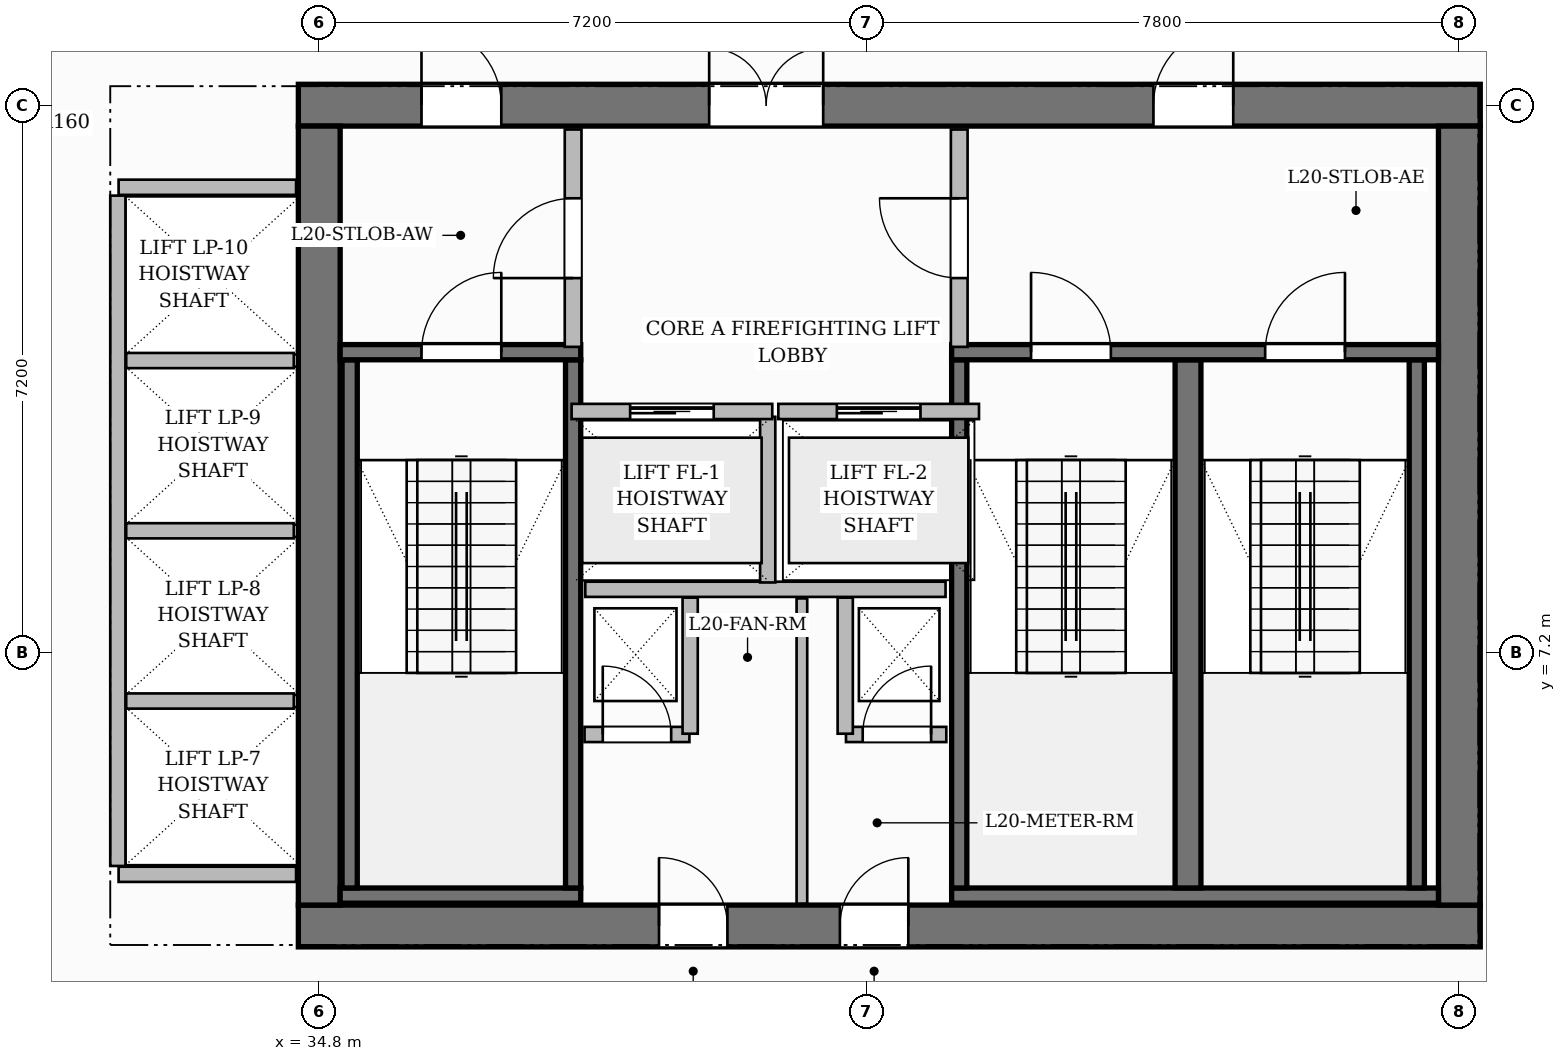
"""IFC4 building model, lengths in metres.
Left out: names, types, materials, properties, quantities, classifications, styles, units other than length and angle.
Written with IfcOpenShell. Run it as: python <this file> out.ifc"""

import sys

from ifc_helpers import new_model, si_unit, direction, frame, frame_2d, origin, place, context, subcontext, project, spatial, rectangle, extrude, source, transform, mapped, element, fill, save


model = new_model("IFC4")
c1 = context("Model", 3, precision=1e-05, world=origin(), true_north=direction((0.0, 1.0)))
c2 = subcontext(c1, "Body", "Model", "MODEL_VIEW")
j1 = project(units=[si_unit("LENGTHUNIT", "METRE"), si_unit("PLANEANGLEUNIT", "RADIAN")], contexts=[c1])
p1 = place(None, origin())
s1 = spatial("IfcSite", under=j1, at=p1, CompositionType="ELEMENT")
p2 = place(p1, origin())
s2 = spatial("IfcBuilding", under=s1, at=p2, CompositionType="ELEMENT")
p3 = place(p2, frame((0.0, 0.0, 84.2)))
s3 = spatial("IfcBuildingStorey", under=s2, at=p3, CompositionType="ELEMENT", Elevation=84.2)
p4 = place(p3, frame((34.525, 3.6, 0.0), z_axis=(0.0, 0.0, 1.0), x_axis=(1.0, 0.0, 0.0)))
e1 = element("IfcWall", 1, at=p4, inside=s3, PredefinedType="SHEAR", context=c2, shape_type="SweptSolid", body=[
    extrude(rectangle(XDim=15.55, YDim=0.55, at=frame_2d((7.775, 0.0))), origin(), (0.0, 0.0, 1.0), 3.7),
])
p5 = place(p4, frame((4.745, 0.0, 0.0)))
e2 = element("IfcOpeningElement", 2, at=p5, cuts=e1, PredefinedType="OPENING", context=c2, shape_type="SweptSolid", body=[
    extrude(rectangle(XDim=0.9, YDim=2.1, at=frame_2d((0.45, 1.05))), frame((0.0, 0.285, 0.0), z_axis=(0.0, -1.0, 0.0), x_axis=(1.0, 0.0, 0.0)), (0.0, 0.0, 1.0), 0.57),
])
p6 = place(p4, frame((7.125, 0.0, 0.0)))
e3 = element("IfcOpeningElement", 3, at=p6, cuts=e1, PredefinedType="OPENING", context=c2, shape_type="SweptSolid", body=[
    extrude(rectangle(XDim=0.9, YDim=2.1, at=frame_2d((0.45, 1.05))), frame((0.0, 0.285, 0.0), z_axis=(0.0, -1.0, 0.0), x_axis=(1.0, 0.0, 0.0)), (0.0, 0.0, 1.0), 0.57),
])
p7 = place(p3, frame((34.525, 14.4, 0.0), z_axis=(0.0, 0.0, 1.0), x_axis=(1.0, 0.0, 0.0)))
e4 = element("IfcWall", 4, at=p7, inside=s3, PredefinedType="SHEAR", context=c2, shape_type="SweptSolid", body=[
    extrude(rectangle(XDim=15.55, YDim=0.55, at=frame_2d((7.775, 0.0))), origin(), (0.0, 0.0, 1.0), 3.7),
])
p8 = place(p7, frame((5.405, 0.0, 0.0)))
e5 = element("IfcOpeningElement", 5, at=p8, cuts=e4, PredefinedType="OPENING", context=c2, shape_type="SweptSolid", body=[
    extrude(rectangle(XDim=1.5, YDim=2.2, at=frame_2d((0.75, 1.1))), frame((0.0, 0.285, 0.0), z_axis=(0.0, -1.0, 0.0), x_axis=(1.0, 0.0, 0.0)), (0.0, 0.0, 1.0), 0.57),
])
p9 = place(p7, frame((1.62, 0.0, 0.0)))
e6 = element("IfcOpeningElement", 6, at=p9, cuts=e4, PredefinedType="OPENING", context=c2, shape_type="SweptSolid", body=[
    extrude(rectangle(XDim=1.05, YDim=2.15, at=frame_2d((0.525, 1.075))), frame((0.0, 0.285, 0.0), z_axis=(0.0, -1.0, 0.0), x_axis=(1.0, 0.0, 0.0)), (0.0, 0.0, 1.0), 0.57),
])
p10 = place(p7, frame((11.25, 0.0, 0.0)))
e7 = element("IfcOpeningElement", 7, at=p10, cuts=e4, PredefinedType="OPENING", context=c2, shape_type="SweptSolid", body=[
    extrude(rectangle(XDim=1.05, YDim=2.15, at=frame_2d((0.525, 1.075))), frame((0.0, 0.285, 0.0), z_axis=(0.0, -1.0, 0.0), x_axis=(1.0, 0.0, 0.0)), (0.0, 0.0, 1.0), 0.57),
])
for number, where, z_axis, x_axis in (
    (8, (34.8, 3.875, 0.0), (0.0, 0.0, 1.0), (0.0, 1.0, 0.0)),
    (9, (49.8, 3.875, 0.0), (0.0, 0.0, 1.0), (0.0, 1.0, 0.0)),
):
    element("IfcWall", number, at=place(p3, frame(where, z_axis=z_axis, x_axis=x_axis)), inside=s3, PredefinedType="SHEAR", context=c2, shape_type="SweptSolid", body=[
        extrude(rectangle(XDim=10.25, YDim=0.55, at=frame_2d((5.125, 0.0))), origin(), (0.0, 0.0, 1.0), 3.7),
    ])
p11 = place(p3, frame((35.075, 4.0, 0.0), z_axis=(0.0, 0.0, 1.0), x_axis=(1.0, 0.0, 0.0)))
e10 = element("IfcWall", 10, at=p11, inside=s3, PredefinedType="SHEAR", context=c2, shape_type="SweptSolid", body=[
    extrude(rectangle(XDim=3.165, YDim=0.2, at=frame_2d((1.583, 0.0))), origin(), (0.0, 0.0, 1.0), 3.7),
])
for number, where, z_axis, x_axis in (
    (11, (35.2, 4.1, 0.0), (0.0, 0.0, 1.0), (0.0, 1.0, 0.0)),
    (12, (38.14, 4.1, 0.0), (0.0, 0.0, 1.0), (0.0, 1.0, 0.0)),
):
    element("IfcWall", number, at=place(p3, frame(where, z_axis=z_axis, x_axis=x_axis)), inside=s3, PredefinedType="SHEAR", context=c2, shape_type="SweptSolid", body=[
        extrude(rectangle(XDim=6.95, YDim=0.2, at=frame_2d((3.475, 0.0))), origin(), (0.0, 0.0, 1.0), 3.7),
    ])
p12 = place(p3, frame((35.075, 11.15, 0.0), z_axis=(0.0, 0.0, 1.0), x_axis=(1.0, 0.0, 0.0)))
e13 = element("IfcWall", 13, at=p12, inside=s3, PredefinedType="SHEAR", context=c2, shape_type="SweptSolid", body=[
    extrude(rectangle(XDim=3.165, YDim=0.2, at=frame_2d((1.583, 0.0))), origin(), (0.0, 0.0, 1.0), 3.7),
])
p13 = place(p12, frame((1.07, 0.0, 0.0)))
e14 = element("IfcOpeningElement", 14, at=p13, cuts=e13, PredefinedType="OPENING", context=c2, shape_type="SweptSolid", body=[
    extrude(rectangle(XDim=1.05, YDim=2.2, at=frame_2d((0.525, 1.1))), frame((0.0, 0.11, 0.0), z_axis=(0.0, -1.0, 0.0), x_axis=(1.0, 0.0, 0.0)), (0.0, 0.0, 1.0), 0.22),
])
p14 = place(p3, frame((43.12, 4.0, 0.0), z_axis=(0.0, 0.0, 1.0), x_axis=(1.0, 0.0, 0.0)))
e15 = element("IfcWall", 15, at=p14, inside=s3, PredefinedType="SHEAR", context=c2, shape_type="SweptSolid", body=[
    extrude(rectangle(XDim=6.405, YDim=0.2, at=frame_2d((3.202, 0.0))), origin(), (0.0, 0.0, 1.0), 3.7),
])
p15 = place(p3, frame((43.22, 4.1, 0.0), z_axis=(0.0, 0.0, 1.0), x_axis=(0.0, 1.0, 0.0)))
e16 = element("IfcWall", 16, at=p15, inside=s3, PredefinedType="SHEAR", context=c2, shape_type="SweptSolid", body=[
    extrude(rectangle(XDim=6.95, YDim=0.2, at=frame_2d((3.475, 0.0))), origin(), (0.0, 0.0, 1.0), 3.7),
])
p16 = place(p3, frame((46.23, 4.1, 0.0), z_axis=(0.0, 0.0, 1.0), x_axis=(0.0, 1.0, 0.0)))
e17 = element("IfcWall", 17, at=p16, inside=s3, PredefinedType="SHEAR", context=c2, shape_type="SweptSolid", body=[
    extrude(rectangle(XDim=6.95, YDim=0.34, at=frame_2d((3.475, 0.0))), origin(), (0.0, 0.0, 1.0), 3.7),
])
p17 = place(p3, frame((49.24, 4.1, 0.0), z_axis=(0.0, 0.0, 1.0), x_axis=(0.0, 1.0, 0.0)))
e18 = element("IfcWall", 18, at=p17, inside=s3, PredefinedType="SHEAR", context=c2, shape_type="SweptSolid", body=[
    extrude(rectangle(XDim=6.95, YDim=0.2, at=frame_2d((3.475, 0.0))), origin(), (0.0, 0.0, 1.0), 3.7),
])
p18 = place(p3, frame((43.12, 11.15, 0.0), z_axis=(0.0, 0.0, 1.0), x_axis=(1.0, 0.0, 0.0)))
e19 = element("IfcWall", 19, at=p18, inside=s3, PredefinedType="SHEAR", context=c2, shape_type="SweptSolid", body=[
    extrude(rectangle(XDim=6.405, YDim=0.2, at=frame_2d((3.202, 0.0))), origin(), (0.0, 0.0, 1.0), 3.7),
])
p19 = place(p18, frame((1.045, 0.0, 0.0)))
e20 = element("IfcOpeningElement", 20, at=p19, cuts=e19, PredefinedType="OPENING", context=c2, shape_type="SweptSolid", body=[
    extrude(rectangle(XDim=1.05, YDim=2.2, at=frame_2d((0.525, 1.1))), frame((0.0, 0.11, 0.0), z_axis=(0.0, -1.0, 0.0), x_axis=(1.0, 0.0, 0.0)), (0.0, 0.0, 1.0), 0.22),
])
p20 = place(p18, frame((4.125, 0.0, 0.0)))
e21 = element("IfcOpeningElement", 21, at=p20, cuts=e19, PredefinedType="OPENING", context=c2, shape_type="SweptSolid", body=[
    extrude(rectangle(XDim=1.05, YDim=2.2, at=frame_2d((0.525, 1.1))), frame((0.0, 0.11, 0.0), z_axis=(0.0, -1.0, 0.0), x_axis=(1.0, 0.0, 0.0)), (0.0, 0.0, 1.0), 0.22),
])
p21 = place(p3, frame((38.3, 8.03, 0.0), z_axis=(0.0, 0.0, 1.0), x_axis=(1.0, 0.0, 0.0)))
e22 = element("IfcWall", 22, at=p21, inside=s3, PredefinedType="PARTITIONING", context=c2, shape_type="SweptSolid", body=[
    extrude(rectangle(XDim=4.74, YDim=0.2, at=frame_2d((2.37, 0.0))), origin(), (0.0, 0.0, 1.0), 3.45),
])
p22 = place(p3, frame((40.7, 8.12, 0.0), z_axis=(0.0, 0.0, 1.0), x_axis=(0.0, 1.0, 0.0)))
e23 = element("IfcWall", 23, at=p22, inside=s3, PredefinedType="PARTITIONING", context=c2, shape_type="SweptSolid", body=[
    extrude(rectangle(XDim=2.18, YDim=0.2, at=frame_2d((1.09, 0.0))), origin(), (0.0, 0.0, 1.0), 3.45),
])
p23 = place(p3, frame((38.14, 11.22, 0.0), z_axis=(0.0, 0.0, 1.0), x_axis=(0.0, 1.0, 0.0)))
e24 = element("IfcWall", 24, at=p23, inside=s3, PredefinedType="PARTITIONING", context=c2, shape_type="SweptSolid", body=[
    extrude(rectangle(XDim=2.86, YDim=0.22, at=frame_2d((1.43, 0.0))), origin(), (0.0, 0.0, 1.0), 3.45),
])
p24 = place(p23, frame((0.905, 0.0, 0.0)))
e25 = element("IfcOpeningElement", 25, at=p24, cuts=e24, PredefinedType="OPENING", context=c2, shape_type="SweptSolid", body=[
    extrude(rectangle(XDim=1.05, YDim=2.15, at=frame_2d((0.525, 1.075))), frame((0.0, 0.12, 0.0), z_axis=(0.0, -1.0, 0.0), x_axis=(1.0, 0.0, 0.0)), (0.0, 0.0, 1.0), 0.24),
])
p25 = place(p3, frame((43.22, 11.22, 0.0), z_axis=(0.0, 0.0, 1.0), x_axis=(0.0, 1.0, 0.0)))
e26 = element("IfcWall", 26, at=p25, inside=s3, PredefinedType="PARTITIONING", context=c2, shape_type="SweptSolid", body=[
    extrude(rectangle(XDim=2.86, YDim=0.22, at=frame_2d((1.43, 0.0))), origin(), (0.0, 0.0, 1.0), 3.45),
])
p26 = place(p25, frame((0.905, 0.0, 0.0)))
e27 = element("IfcOpeningElement", 27, at=p26, cuts=e26, PredefinedType="OPENING", context=c2, shape_type="SweptSolid", body=[
    extrude(rectangle(XDim=1.05, YDim=2.15, at=frame_2d((0.525, 1.075))), frame((0.0, 0.12, 0.0), z_axis=(0.0, -1.0, 0.0), x_axis=(1.0, 0.0, 0.0)), (0.0, 0.0, 1.0), 0.24),
])
p27 = place(p3, frame((38.29, 6.12, 0.0), z_axis=(0.0, 0.0, 1.0), x_axis=(1.0, 0.0, 0.0)))
e28 = element("IfcWall", 28, at=p27, inside=s3, PredefinedType="PARTITIONING", context=c2, shape_type="SweptSolid", body=[
    extrude(rectangle(XDim=1.38, YDim=0.2, at=frame_2d((0.69, 0.0))), origin(), (0.0, 0.0, 1.0), 3.45),
])
p28 = place(p27, frame((0.24, 0.0, 0.0)))
e29 = element("IfcOpeningElement", 29, at=p28, cuts=e28, PredefinedType="OPENING", context=c2, shape_type="SweptSolid", body=[
    extrude(rectangle(XDim=0.9, YDim=2.1, at=frame_2d((0.45, 1.05))), frame((0.0, 0.11, 0.0), z_axis=(0.0, -1.0, 0.0), x_axis=(1.0, 0.0, 0.0)), (0.0, 0.0, 1.0), 0.22),
])
p29 = place(p3, frame((39.68, 6.13, 0.0), z_axis=(0.0, 0.0, 1.0), x_axis=(0.0, 1.0, 0.0)))
e30 = element("IfcWall", 30, at=p29, inside=s3, PredefinedType="PARTITIONING", context=c2, shape_type="SweptSolid", body=[
    extrude(rectangle(XDim=1.79, YDim=0.2, at=frame_2d((0.895, 0.0))), origin(), (0.0, 0.0, 1.0), 3.45),
])
p30 = place(p3, frame((41.73, 6.12, 0.0), z_axis=(0.0, 0.0, 1.0), x_axis=(1.0, 0.0, 0.0)))
e31 = element("IfcWall", 31, at=p30, inside=s3, PredefinedType="PARTITIONING", context=c2, shape_type="SweptSolid", body=[
    extrude(rectangle(XDim=1.32, YDim=0.2, at=frame_2d((0.66, 0.0))), origin(), (0.0, 0.0, 1.0), 3.45),
])
p31 = place(p30, frame((0.22, 0.0, 0.0)))
e32 = element("IfcOpeningElement", 32, at=p31, cuts=e31, PredefinedType="OPENING", context=c2, shape_type="SweptSolid", body=[
    extrude(rectangle(XDim=0.9, YDim=2.1, at=frame_2d((0.45, 1.05))), frame((0.0, 0.11, 0.0), z_axis=(0.0, -1.0, 0.0), x_axis=(1.0, 0.0, 0.0)), (0.0, 0.0, 1.0), 0.22),
])
p32 = place(p3, frame((41.72, 6.13, 0.0), z_axis=(0.0, 0.0, 1.0), x_axis=(0.0, 1.0, 0.0)))
e33 = element("IfcWall", 33, at=p32, inside=s3, PredefinedType="PARTITIONING", context=c2, shape_type="SweptSolid", body=[
    extrude(rectangle(XDim=1.79, YDim=0.2, at=frame_2d((0.895, 0.0))), origin(), (0.0, 0.0, 1.0), 3.45),
])
p33 = place(p3, frame((41.15, 3.895, 0.0), z_axis=(0.0, 0.0, 1.0), x_axis=(0.0, 1.0, 0.0)))
e34 = element("IfcWall", 34, at=p33, inside=s3, PredefinedType="PARTITIONING", context=c2, shape_type="SweptSolid", body=[
    extrude(rectangle(XDim=4.015, YDim=0.14, at=frame_2d((2.007, 0.0))), origin(), (0.0, 0.0, 1.0), 3.45),
])
for number, where, z_axis, x_axis in (
    (35, (32.16, 4.28, 0.0), (0.0, 0.0, 1.0), (1.0, 0.0, 0.0)),
    (36, (32.16, 13.32, 0.0), (0.0, 0.0, 1.0), (1.0, 0.0, 0.0)),
):
    element("IfcWall", number, at=place(p3, frame(where, z_axis=z_axis, x_axis=x_axis)), inside=s3, PredefinedType="PARTITIONING", context=c2, shape_type="SweptSolid", body=[
        extrude(rectangle(XDim=2.335, YDim=0.2, at=frame_2d((1.167, 0.0))), origin(), (0.0, 0.0, 1.0), 3.45),
    ])
p34 = place(p3, frame((32.15, 4.39, 0.0), z_axis=(0.0, 0.0, 1.0), x_axis=(0.0, 1.0, 0.0)))
e37 = element("IfcWall", 37, at=p34, inside=s3, PredefinedType="PARTITIONING", context=c2, shape_type="SweptSolid", body=[
    extrude(rectangle(XDim=8.82, YDim=0.2, at=frame_2d((4.41, 0.0))), origin(), (0.0, 0.0, 1.0), 3.45),
])
for number, where, z_axis, x_axis in (
    (38, (32.26, 6.56, 0.0), (0.0, 0.0, 1.0), (1.0, 0.0, 0.0)),
    (39, (32.26, 8.8, 0.0), (0.0, 0.0, 1.0), (1.0, 0.0, 0.0)),
    (40, (32.26, 11.04, 0.0), (0.0, 0.0, 1.0), (1.0, 0.0, 0.0)),
):
    element("IfcWall", number, at=place(p3, frame(where, z_axis=z_axis, x_axis=x_axis)), inside=s3, PredefinedType="PARTITIONING", context=c2, shape_type="SweptSolid", body=[
        extrude(rectangle(XDim=2.205, YDim=0.2, at=frame_2d((1.103, 0.0))), origin(), (0.0, 0.0, 1.0), 3.45),
    ])
p35 = place(p3, frame((38.12, 10.37, 0.0), z_axis=(0.0, 0.0, 1.0), x_axis=(1.0, 0.0, 0.0)))
e41 = element("IfcWall", 41, at=p35, inside=s3, PredefinedType="PARTITIONING", context=c2, shape_type="SweptSolid", body=[
    extrude(rectangle(XDim=2.64, YDim=0.2, at=frame_2d((1.32, 0.0))), origin(), (0.0, 0.0, 1.0), 3.45),
])
p36 = place(p35, frame((0.77, 0.0, 0.0)))
e42 = element("IfcOpeningElement", 42, at=p36, cuts=e41, PredefinedType="OPENING", context=c2, shape_type="SweptSolid", body=[
    extrude(rectangle(XDim=1.1, YDim=2.2, at=frame_2d((0.55, 1.1))), frame((0.0, 0.11, 0.0), z_axis=(0.0, -1.0, 0.0), x_axis=(1.0, 0.0, 0.0)), (0.0, 0.0, 1.0), 0.22),
])
p37 = place(p3, frame((40.84, 10.37, 0.0), z_axis=(0.0, 0.0, 1.0), x_axis=(1.0, 0.0, 0.0)))
e43 = element("IfcWall", 43, at=p37, inside=s3, PredefinedType="PARTITIONING", context=c2, shape_type="SweptSolid", body=[
    extrude(rectangle(XDim=2.64, YDim=0.2, at=frame_2d((1.32, 0.0))), origin(), (0.0, 0.0, 1.0), 3.45),
])
p38 = place(p37, frame((0.77, 0.0, 0.0)))
e44 = element("IfcOpeningElement", 44, at=p38, cuts=e43, PredefinedType="OPENING", context=c2, shape_type="SweptSolid", body=[
    extrude(rectangle(XDim=1.1, YDim=2.2, at=frame_2d((0.55, 1.1))), frame((0.0, 0.11, 0.0), z_axis=(0.0, -1.0, 0.0), x_axis=(1.0, 0.0, 0.0)), (0.0, 0.0, 1.0), 0.22),
])
m1 = source(origin(), c2, "Body", "SweptSolid", [
    extrude(rectangle(XDim=1.05, YDim=2.2, at=frame_2d((0.525, 1.1))), frame((0.0, 0.025, 0.0), z_axis=(0.0, -1.0, 0.0), x_axis=(1.0, 0.0, 0.0)), (0.0, 0.0, 1.0), 0.05),
])
p39 = place(p13, origin())
e45 = element("IfcDoor", 45, at=p39, inside=s3, OperationType="SINGLE_SWING_RIGHT", PredefinedType="DOOR", context=c2, shape_type="MappedRepresentation", body=[
    mapped(m1, transform((0.0, 0.0, 0.0), scale=1.0)),
])
fill(e14, e45)
p40 = place(p19, origin())
e46 = element("IfcDoor", 46, at=p40, inside=s3, OperationType="SINGLE_SWING_LEFT", PredefinedType="DOOR", context=c2, shape_type="MappedRepresentation", body=[
    mapped(m1, transform((0.0, 0.0, 0.0), scale=1.0)),
])
fill(e20, e46)
p41 = place(p20, origin())
e47 = element("IfcDoor", 47, at=p41, inside=s3, OperationType="SINGLE_SWING_RIGHT", PredefinedType="DOOR", context=c2, shape_type="MappedRepresentation", body=[
    mapped(m1, transform((0.0, 0.0, 0.0), scale=1.0)),
])
fill(e21, e47)
m2 = source(origin(), c2, "Body", "SweptSolid", [
    extrude(rectangle(XDim=1.05, YDim=2.15, at=frame_2d((0.525, 1.075))), frame((0.0, 0.025, 0.0), z_axis=(0.0, -1.0, 0.0), x_axis=(1.0, 0.0, 0.0)), (0.0, 0.0, 1.0), 0.05),
])
p42 = place(p24, origin())
e48 = element("IfcDoor", 48, at=p42, inside=s3, OperationType="SINGLE_SWING_LEFT", PredefinedType="DOOR", context=c2, shape_type="MappedRepresentation", body=[
    mapped(m2, transform((0.0, 0.0, 0.0), scale=1.0)),
])
fill(e25, e48)
p43 = place(p26, origin())
e49 = element("IfcDoor", 49, at=p43, inside=s3, OperationType="SINGLE_SWING_RIGHT", PredefinedType="DOOR", context=c2, shape_type="MappedRepresentation", body=[
    mapped(m2, transform((0.0, 0.0, 0.0), scale=1.0)),
])
fill(e27, e49)
m3 = source(origin(), c2, "Body", "SweptSolid", [
    extrude(rectangle(XDim=1.5, YDim=2.2, at=frame_2d((0.75, 1.1))), frame((0.0, 0.025, 0.0), z_axis=(0.0, -1.0, 0.0), x_axis=(1.0, 0.0, 0.0)), (0.0, 0.0, 1.0), 0.05),
])
p44 = place(p8, origin())
e50 = element("IfcDoor", 50, at=p44, inside=s3, OperationType="DOUBLE_DOOR_SINGLE_SWING", PredefinedType="DOOR", context=c2, shape_type="MappedRepresentation", body=[
    mapped(m3, transform((0.0, 0.0, 0.0), scale=1.0)),
])
fill(e5, e50)
p45 = place(p9, origin())
e51 = element("IfcDoor", 51, at=p45, inside=s3, OperationType="SINGLE_SWING_LEFT", PredefinedType="DOOR", context=c2, shape_type="MappedRepresentation", body=[
    mapped(m2, transform((0.0, 0.0, 0.0), scale=1.0)),
])
fill(e6, e51)
p46 = place(p10, origin())
e52 = element("IfcDoor", 52, at=p46, inside=s3, OperationType="SINGLE_SWING_RIGHT", PredefinedType="DOOR", context=c2, shape_type="MappedRepresentation", body=[
    mapped(m2, transform((0.0, 0.0, 0.0), scale=1.0)),
])
fill(e7, e52)
m4 = source(origin(), c2, "Body", "SweptSolid", [
    extrude(rectangle(XDim=0.9, YDim=2.1, at=frame_2d((0.45, 1.05))), frame((0.0, 0.025, 0.0), z_axis=(0.0, -1.0, 0.0), x_axis=(1.0, 0.0, 0.0)), (0.0, 0.0, 1.0), 0.05),
])
p47 = place(p28, origin())
e53 = element("IfcDoor", 53, at=p47, inside=s3, OperationType="SINGLE_SWING_LEFT", PredefinedType="DOOR", context=c2, shape_type="MappedRepresentation", body=[
    mapped(m4, transform((0.0, 0.0, 0.0), scale=1.0)),
])
fill(e29, e53)
p48 = place(p31, origin())
e54 = element("IfcDoor", 54, at=p48, inside=s3, OperationType="SINGLE_SWING_RIGHT", PredefinedType="DOOR", context=c2, shape_type="MappedRepresentation", body=[
    mapped(m4, transform((0.0, 0.0, 0.0), scale=1.0)),
])
fill(e32, e54)
p49 = place(p5, origin())
e55 = element("IfcDoor", 55, at=p49, inside=s3, OperationType="SINGLE_SWING_LEFT", PredefinedType="DOOR", context=c2, shape_type="MappedRepresentation", body=[
    mapped(m4, transform((0.0, 0.0, 0.0), scale=1.0)),
])
fill(e2, e55)
p50 = place(p6, origin())
e56 = element("IfcDoor", 56, at=p50, inside=s3, OperationType="SINGLE_SWING_RIGHT", PredefinedType="DOOR", context=c2, shape_type="MappedRepresentation", body=[
    mapped(m4, transform((0.0, 0.0, 0.0), scale=1.0)),
])
fill(e3, e56)
m5 = source(origin(), c2, "Body", "SweptSolid", [
    extrude(rectangle(XDim=1.1, YDim=2.2, at=frame_2d((0.55, 1.1))), frame((0.0, 0.025, 0.0), z_axis=(0.0, -1.0, 0.0), x_axis=(1.0, 0.0, 0.0)), (0.0, 0.0, 1.0), 0.05),
])
p51 = place(p36, origin())
e57 = element("IfcDoor", 57, at=p51, inside=s3, OperationType="SLIDING_TO_LEFT", PredefinedType="DOOR", context=c2, shape_type="MappedRepresentation", body=[
    mapped(m5, transform((0.0, 0.0, 0.0), scale=1.0)),
])
fill(e42, e57)
p52 = place(p38, origin())
e58 = element("IfcDoor", 58, at=p52, inside=s3, OperationType="SLIDING_TO_LEFT", PredefinedType="DOOR", context=c2, shape_type="MappedRepresentation", body=[
    mapped(m5, transform((0.0, 0.0, 0.0), scale=1.0)),
])
fill(e44, e58)
save(model, sys.argv[1])
